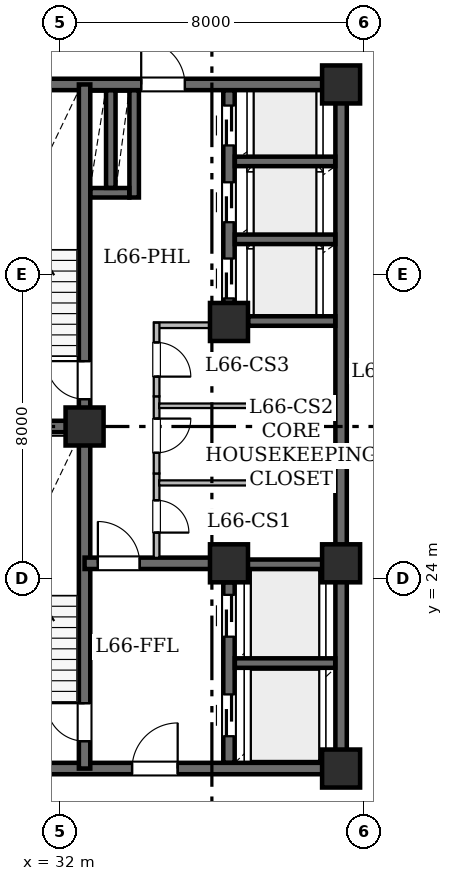
"""IFC4 building model, lengths in metres.
Left out: names, types, materials, properties, quantities, classifications, styles, units other than length and angle.
Written with IfcOpenShell. Run it as: python <this file> out.ifc"""

import sys

from ifc_helpers import new_model, si_unit, direction, frame, frame_2d, origin, origin_2d, place, context, subcontext, project, spatial, rectangle, hollow_rectangle, extrude, element, fill, save


model = new_model("IFC4")
c1 = context("Model", 3, precision=1e-05, world=origin(), true_north=direction((0.0, 1.0)))
c2 = subcontext(c1, "Body", "Model", "MODEL_VIEW")
j1 = project(units=[si_unit("LENGTHUNIT", "METRE"), si_unit("PLANEANGLEUNIT", "RADIAN")], contexts=[c1])
p1 = place(None, origin())
s1 = spatial("IfcSite", under=j1, at=p1, CompositionType="ELEMENT")
p2 = place(p1, origin())
s2 = spatial("IfcBuilding", under=s1, at=p2, CompositionType="ELEMENT")
p3 = place(p2, frame((0.0, 0.0, 257.35)))
s3 = spatial("IfcBuildingStorey", under=s2, at=p3, CompositionType="ELEMENT", Elevation=257.35)
for number, where, z_axis, x_axis in (
    (1, (32.65, 28.0, 0.0), (0.0, 0.0, 1.0), (1.0, 0.0, 0.0)),
    (2, (39.4, 19.0, 0.0), (0.0, 0.0, 1.0), (1.0, 0.0, 0.0)),
    (3, (36.45, 24.4, 0.0), (0.0, 0.0, 1.0), (1.0, 0.0, 0.0)),
    (4, (39.4, 24.4, 0.0), (0.0, 0.0, 1.0), (1.0, 0.0, 0.0)),
    (5, (36.45, 30.75, 0.0), (0.0, 0.0, 1.0), (1.0, 0.0, 0.0)),
    (6, (39.4, 37.0, 0.0), (0.0, 0.0, 1.0), (1.0, 0.0, 0.0)),
):
    element("IfcColumn", number, at=place(p3, frame(where, z_axis=z_axis, x_axis=x_axis)), inside=s3, PredefinedType="COLUMN", context=c2, shape_type="SweptSolid", body=[
        extrude(hollow_rectangle(XDim=1.0, YDim=1.0, WallThickness=0.05, at=origin_2d()), origin(), (0.0, 0.0, 1.0), 3.65),
    ])
p4 = place(p3, frame((29.0, 19.0, 0.0), z_axis=(0.0, 0.0, 1.0), x_axis=(1.0, 0.0, 0.0)))
e7 = element("IfcWall", 7, at=p4, inside=s3, PredefinedType="SHEAR", context=c2, shape_type="SweptSolid", body=[
    extrude(rectangle(XDim=10.4, YDim=0.3, at=frame_2d((5.2, 0.0))), origin(), (0.0, 0.0, 1.0), 3.43),
])
p5 = place(p4, frame((4.9, 0.0, 0.0)))
e8 = element("IfcOpeningElement", 8, at=p5, cuts=e7, PredefinedType="OPENING", context=c2, shape_type="SweptSolid", body=[
    extrude(rectangle(XDim=1.2, YDim=2.15, at=frame_2d((0.6, 1.075))), frame((0.0, 0.16, 0.0), z_axis=(0.0, -1.0, 0.0), x_axis=(1.0, 0.0, 0.0)), (0.0, 0.0, 1.0), 0.32),
])
p6 = place(p3, frame((29.0, 37.0, 0.0), z_axis=(0.0, 0.0, 1.0), x_axis=(1.0, 0.0, 0.0)))
e9 = element("IfcWall", 9, at=p6, inside=s3, PredefinedType="SHEAR", context=c2, shape_type="SweptSolid", body=[
    extrude(rectangle(XDim=10.4, YDim=0.3, at=frame_2d((5.2, 0.0))), origin(), (0.0, 0.0, 1.0), 3.43),
])
p7 = place(p6, frame((5.14, 0.0, 0.0)))
e10 = element("IfcOpeningElement", 10, at=p7, cuts=e9, PredefinedType="OPENING", context=c2, shape_type="SweptSolid", body=[
    extrude(rectangle(XDim=1.15, YDim=2.2, at=frame_2d((0.575, 1.1))), frame((0.0, 0.16, 0.0), z_axis=(0.0, -1.0, 0.0), x_axis=(1.0, 0.0, 0.0)), (0.0, 0.0, 1.0), 0.32),
])
p8 = place(p3, frame((39.4, 19.0, 0.0), z_axis=(0.0, 0.0, 1.0), x_axis=(0.0, 1.0, 0.0)))
e11 = element("IfcWall", 11, at=p8, inside=s3, PredefinedType="SHEAR", context=c2, shape_type="SweptSolid", body=[
    extrude(rectangle(XDim=5.4, YDim=0.3, at=frame_2d((2.7, 0.0))), origin(), (0.0, 0.0, 1.0), 3.43),
])
p9 = place(p3, frame((39.4, 24.4, 0.0), z_axis=(0.0, 0.0, 1.0), x_axis=(0.0, 1.0, 0.0)))
e12 = element("IfcWall", 12, at=p9, inside=s3, PredefinedType="SHEAR", context=c2, shape_type="SweptSolid", body=[
    extrude(rectangle(XDim=12.6, YDim=0.3, at=frame_2d((6.3, 0.0))), origin(), (0.0, 0.0, 1.0), 3.43),
])
p10 = place(p3, frame((32.65, 19.0, 0.0), z_axis=(0.0, 0.0, 1.0), x_axis=(0.0, 1.0, 0.0)))
e13 = element("IfcWall", 13, at=p10, inside=s3, PredefinedType="SHEAR", context=c2, shape_type="SweptSolid", body=[
    extrude(rectangle(XDim=9.0, YDim=0.3, at=frame_2d((4.5, 0.0))), origin(), (0.0, 0.0, 1.0), 3.43),
])
p11 = place(p10, frame((0.72, 0.0, 0.0)))
e14 = element("IfcOpeningElement", 14, at=p11, cuts=e13, PredefinedType="OPENING", context=c2, shape_type="SweptSolid", body=[
    extrude(rectangle(XDim=1.0, YDim=2.15, at=frame_2d((0.5, 1.075))), frame((0.0, 0.16, 0.0), z_axis=(0.0, -1.0, 0.0), x_axis=(1.0, 0.0, 0.0)), (0.0, 0.0, 1.0), 0.32),
])
p12 = place(p3, frame((32.65, 28.0, 0.0), z_axis=(0.0, 0.0, 1.0), x_axis=(0.0, 1.0, 0.0)))
e15 = element("IfcWall", 15, at=p12, inside=s3, PredefinedType="SHEAR", context=c2, shape_type="SweptSolid", body=[
    extrude(rectangle(XDim=9.0, YDim=0.3, at=frame_2d((4.5, 0.0))), origin(), (0.0, 0.0, 1.0), 3.43),
])
p13 = place(p12, frame((0.72, 0.0, 0.0)))
e16 = element("IfcOpeningElement", 16, at=p13, cuts=e15, PredefinedType="OPENING", context=c2, shape_type="SweptSolid", body=[
    extrude(rectangle(XDim=1.0, YDim=2.15, at=frame_2d((0.5, 1.075))), frame((0.0, 0.16, 0.0), z_axis=(0.0, -1.0, 0.0), x_axis=(1.0, 0.0, 0.0)), (0.0, 0.0, 1.0), 0.32),
])
p14 = place(p3, frame((29.0, 28.0, 0.0), z_axis=(0.0, 0.0, 1.0), x_axis=(1.0, 0.0, 0.0)))
e17 = element("IfcWall", 17, at=p14, inside=s3, PredefinedType="SHEAR", context=c2, shape_type="SweptSolid", body=[
    extrude(rectangle(XDim=3.65, YDim=0.3, at=frame_2d((1.825, 0.0))), origin(), (0.0, 0.0, 1.0), 3.43),
])
p15 = place(p3, frame((32.65, 24.4, 0.0), z_axis=(0.0, 0.0, 1.0), x_axis=(1.0, 0.0, 0.0)))
e18 = element("IfcWall", 18, at=p15, inside=s3, PredefinedType="SHEAR", context=c2, shape_type="SweptSolid", body=[
    extrude(rectangle(XDim=3.8, YDim=0.3, at=frame_2d((1.9, 0.0))), origin(), (0.0, 0.0, 1.0), 3.43),
])
p16 = place(p15, frame((0.35, 0.0, 0.0)))
e19 = element("IfcOpeningElement", 19, at=p16, cuts=e18, PredefinedType="OPENING", context=c2, shape_type="SweptSolid", body=[
    extrude(rectangle(XDim=1.1, YDim=2.15, at=frame_2d((0.55, 1.075))), frame((0.0, 0.16, 0.0), z_axis=(0.0, -1.0, 0.0), x_axis=(1.0, 0.0, 0.0)), (0.0, 0.0, 1.0), 0.32),
])
p17 = place(p3, frame((36.45, 19.154, 0.0), z_axis=(0.0, 0.0, 1.0), x_axis=(0.0, 1.0, 0.0)))
e20 = element("IfcWall", 20, at=p17, inside=s3, PredefinedType="SHEAR", context=c2, shape_type="SweptSolid", body=[
    extrude(rectangle(XDim=4.746, YDim=0.3, at=frame_2d((2.373, 0.0))), origin(), (0.0, 0.0, 1.0), 3.43),
])
p18 = place(p17, frame((0.696, 0.0, 0.0)))
e21 = element("IfcOpeningElement", 21, at=p18, cuts=e20, PredefinedType="OPENING", context=c2, shape_type="SweptSolid", body=[
    extrude(rectangle(XDim=1.1, YDim=2.15, at=frame_2d((0.55, 1.075))), frame((0.0, 0.16, 0.0), z_axis=(0.0, -1.0, 0.0), x_axis=(1.0, 0.0, 0.0)), (0.0, 0.0, 1.0), 0.32),
])
p19 = place(p17, frame((3.316, 0.0, 0.0)))
e22 = element("IfcOpeningElement", 22, at=p19, cuts=e20, PredefinedType="OPENING", context=c2, shape_type="SweptSolid", body=[
    extrude(rectangle(XDim=1.1, YDim=2.15, at=frame_2d((0.55, 1.075))), frame((0.0, 0.16, 0.0), z_axis=(0.0, -1.0, 0.0), x_axis=(1.0, 0.0, 0.0)), (0.0, 0.0, 1.0), 0.32),
])
p20 = place(p3, frame((36.45, 31.25, 0.0), z_axis=(0.0, 0.0, 1.0), x_axis=(0.0, 1.0, 0.0)))
e23 = element("IfcWall", 23, at=p20, inside=s3, PredefinedType="SHEAR", context=c2, shape_type="SweptSolid", body=[
    extrude(rectangle(XDim=5.596, YDim=0.3, at=frame_2d((2.798, 0.0))), origin(), (0.0, 0.0, 1.0), 3.43),
])
p21 = place(p20, frame((0.12, 0.0, 0.0)))
e24 = element("IfcOpeningElement", 24, at=p21, cuts=e23, PredefinedType="OPENING", context=c2, shape_type="SweptSolid", body=[
    extrude(rectangle(XDim=1.05, YDim=2.15, at=frame_2d((0.525, 1.075))), frame((0.0, 0.16, 0.0), z_axis=(0.0, -1.0, 0.0), x_axis=(1.0, 0.0, 0.0)), (0.0, 0.0, 1.0), 0.32),
])
p22 = place(p20, frame((2.125, 0.0, 0.0)))
e25 = element("IfcOpeningElement", 25, at=p22, cuts=e23, PredefinedType="OPENING", context=c2, shape_type="SweptSolid", body=[
    extrude(rectangle(XDim=1.05, YDim=2.15, at=frame_2d((0.525, 1.075))), frame((0.0, 0.16, 0.0), z_axis=(0.0, -1.0, 0.0), x_axis=(1.0, 0.0, 0.0)), (0.0, 0.0, 1.0), 0.32),
])
p23 = place(p20, frame((4.145, 0.0, 0.0)))
e26 = element("IfcOpeningElement", 26, at=p23, cuts=e23, PredefinedType="OPENING", context=c2, shape_type="SweptSolid", body=[
    extrude(rectangle(XDim=1.05, YDim=2.15, at=frame_2d((0.525, 1.075))), frame((0.0, 0.16, 0.0), z_axis=(0.0, -1.0, 0.0), x_axis=(1.0, 0.0, 0.0)), (0.0, 0.0, 1.0), 0.32),
])
for number, where, z_axis, x_axis in (
    (27, (36.604, 21.775, 0.0), (0.0, 0.0, 1.0), (1.0, 0.0, 0.0)),
    (28, (36.604, 24.375, 0.0), (0.0, 0.0, 1.0), (1.0, 0.0, 0.0)),
):
    element("IfcWall", number, at=place(p3, frame(where, z_axis=z_axis, x_axis=x_axis)), inside=s3, PredefinedType="SHEAR", context=c2, shape_type="SweptSolid", body=[
        extrude(rectangle(XDim=2.642, YDim=0.25, at=frame_2d((1.321, 0.0))), origin(), (0.0, 0.0, 1.0), 3.43),
    ])
p24 = place(p3, frame((36.954, 30.775, 0.0), z_axis=(0.0, 0.0, 1.0), x_axis=(1.0, 0.0, 0.0)))
e29 = element("IfcWall", 29, at=p24, inside=s3, PredefinedType="SHEAR", context=c2, shape_type="SweptSolid", body=[
    extrude(rectangle(XDim=2.292, YDim=0.25, at=frame_2d((1.146, 0.0))), origin(), (0.0, 0.0, 1.0), 3.43),
])
for number, where, z_axis, x_axis in (
    (30, (36.604, 32.925, 0.0), (0.0, 0.0, 1.0), (1.0, 0.0, 0.0)),
    (31, (36.604, 34.975, 0.0), (0.0, 0.0, 1.0), (1.0, 0.0, 0.0)),
):
    element("IfcWall", number, at=place(p3, frame(where, z_axis=z_axis, x_axis=x_axis)), inside=s3, PredefinedType="SHEAR", context=c2, shape_type="SweptSolid", body=[
        extrude(rectangle(XDim=2.642, YDim=0.25, at=frame_2d((1.321, 0.0))), origin(), (0.0, 0.0, 1.0), 3.43),
    ])
p25 = place(p3, frame((33.955, 34.025, 0.0), z_axis=(0.0, 0.0, 1.0), x_axis=(0.0, 1.0, 0.0)))
e32 = element("IfcWall", 32, at=p25, inside=s3, PredefinedType="SHEAR", context=c2, shape_type="SweptSolid", body=[
    extrude(rectangle(XDim=2.821, YDim=0.25, at=frame_2d((1.411, 0.0))), origin(), (0.0, 0.0, 1.0), 3.43),
])
p26 = place(p3, frame((32.804, 34.15, 0.0), z_axis=(0.0, 0.0, 1.0), x_axis=(1.0, 0.0, 0.0)))
e33 = element("IfcWall", 33, at=p26, inside=s3, PredefinedType="SHEAR", context=c2, shape_type="SweptSolid", body=[
    extrude(rectangle(XDim=1.022, YDim=0.25, at=frame_2d((0.511, 0.0))), origin(), (0.0, 0.0, 1.0), 3.43),
])
p27 = place(p3, frame((33.34, 34.279, 0.0), z_axis=(0.0, 0.0, 1.0), x_axis=(0.0, 1.0, 0.0)))
e34 = element("IfcWall", 34, at=p27, inside=s3, PredefinedType="SHEAR", context=c2, shape_type="SweptSolid", body=[
    extrude(rectangle(XDim=2.567, YDim=0.25, at=frame_2d((1.283, 0.0))), origin(), (0.0, 0.0, 1.0), 3.43),
])
p28 = place(p3, frame((34.545, 26.764, 0.0), z_axis=(0.0, 0.0, 1.0), x_axis=(0.0, -1.0, 0.0)))
e35 = element("IfcWall", 35, at=p28, inside=s3, PredefinedType="STANDARD", context=c2, shape_type="SweptSolid", body=[
    extrude(rectangle(XDim=2.22, YDim=0.15, at=frame_2d((1.11, 0.0))), origin(), (0.0, 0.0, 1.0), 3.43),
])
p29 = place(p28, frame((0.706, 0.0, 0.0)))
e36 = element("IfcOpeningElement", 36, at=p29, cuts=e35, PredefinedType="OPENING", context=c2, shape_type="SweptSolid", body=[
    extrude(rectangle(XDim=0.85, YDim=2.1, at=frame_2d((0.425, 1.05))), frame((0.0, 0.085, 0.0), z_axis=(0.0, -1.0, 0.0), x_axis=(1.0, 0.0, 0.0)), (0.0, 0.0, 1.0), 0.17),
])
p30 = place(p3, frame((34.545, 28.794, 0.0), z_axis=(0.0, 0.0, 1.0), x_axis=(0.0, -1.0, 0.0)))
e37 = element("IfcWall", 37, at=p30, inside=s3, PredefinedType="STANDARD", context=c2, shape_type="SweptSolid", body=[
    extrude(rectangle(XDim=2.03, YDim=0.15, at=frame_2d((1.015, 0.0))), origin(), (0.0, 0.0, 1.0), 3.43),
])
p31 = place(p30, frame((0.586, 0.0, 0.0)))
e38 = element("IfcOpeningElement", 38, at=p31, cuts=e37, PredefinedType="OPENING", context=c2, shape_type="SweptSolid", body=[
    extrude(rectangle(XDim=0.9, YDim=2.1, at=frame_2d((0.45, 1.05))), frame((0.0, 0.085, 0.0), z_axis=(0.0, -1.0, 0.0), x_axis=(1.0, 0.0, 0.0)), (0.0, 0.0, 1.0), 0.17),
])
p32 = place(p3, frame((36.3, 30.665, 0.0), z_axis=(0.0, 0.0, 1.0), x_axis=(-1.0, 0.0, 0.0)))
e39 = element("IfcWall", 39, at=p32, inside=s3, PredefinedType="STANDARD", context=c2, shape_type="SweptSolid", body=[
    extrude(rectangle(XDim=1.82, YDim=0.15, at=frame_2d((0.91, 0.0))), origin(), (0.0, 0.0, 1.0), 3.43),
])
p33 = place(p3, frame((34.545, 30.73, 0.0), z_axis=(0.0, 0.0, 1.0), x_axis=(0.0, -1.0, 0.0)))
e40 = element("IfcWall", 40, at=p33, inside=s3, PredefinedType="STANDARD", context=c2, shape_type="SweptSolid", body=[
    extrude(rectangle(XDim=1.936, YDim=0.15, at=frame_2d((0.968, 0.0))), origin(), (0.0, 0.0, 1.0), 3.43),
])
p34 = place(p33, frame((0.518, 0.0, 0.0)))
e41 = element("IfcOpeningElement", 41, at=p34, cuts=e40, PredefinedType="OPENING", context=c2, shape_type="SweptSolid", body=[
    extrude(rectangle(XDim=0.9, YDim=2.1, at=frame_2d((0.45, 1.05))), frame((0.0, 0.085, 0.0), z_axis=(0.0, -1.0, 0.0), x_axis=(1.0, 0.0, 0.0)), (0.0, 0.0, 1.0), 0.17),
])
p35 = place(p3, frame((34.612, 26.515, 0.0), z_axis=(0.0, 0.0, 1.0), x_axis=(1.0, 0.0, 0.0)))
e42 = element("IfcWall", 42, at=p35, inside=s3, PredefinedType="PARTITIONING", context=c2, shape_type="SweptSolid", body=[
    extrude(rectangle(XDim=4.644, YDim=0.135, at=frame_2d((2.322, 0.0))), origin(), (0.0, 0.0, 1.0), 3.43),
])
p36 = place(p3, frame((34.612, 28.545, 0.0), z_axis=(0.0, 0.0, 1.0), x_axis=(1.0, 0.0, 0.0)))
e43 = element("IfcWall", 43, at=p36, inside=s3, PredefinedType="PARTITIONING", context=c2, shape_type="SweptSolid", body=[
    extrude(rectangle(XDim=4.644, YDim=0.12, at=frame_2d((2.322, 0.0))), origin(), (0.0, 0.0, 1.0), 3.43),
])
p37 = place(p11, origin())
e44 = element("IfcDoor", 44, at=p37, inside=s3, OperationType="SINGLE_SWING_RIGHT", PredefinedType="DOOR", context=c2, shape_type="SweptSolid", body=[
    extrude(rectangle(XDim=1.0, YDim=2.15, at=frame_2d((0.5, 1.075))), frame((0.0, 0.025, 0.0), z_axis=(0.0, -1.0, 0.0), x_axis=(1.0, 0.0, 0.0)), (0.0, 0.0, 1.0), 0.05),
])
fill(e14, e44)
p38 = place(p13, origin())
e45 = element("IfcDoor", 45, at=p38, inside=s3, OperationType="SINGLE_SWING_RIGHT", PredefinedType="DOOR", context=c2, shape_type="SweptSolid", body=[
    extrude(rectangle(XDim=1.0, YDim=2.15, at=frame_2d((0.5, 1.075))), frame((0.0, 0.025, 0.0), z_axis=(0.0, -1.0, 0.0), x_axis=(1.0, 0.0, 0.0)), (0.0, 0.0, 1.0), 0.05),
])
fill(e16, e45)
p39 = place(p16, origin())
e46 = element("IfcDoor", 46, at=p39, inside=s3, OperationType="SINGLE_SWING_LEFT", PredefinedType="DOOR", context=c2, shape_type="SweptSolid", body=[
    extrude(rectangle(XDim=1.1, YDim=2.15, at=frame_2d((0.55, 1.075))), frame((0.0, 0.025, 0.0), z_axis=(0.0, -1.0, 0.0), x_axis=(1.0, 0.0, 0.0)), (0.0, 0.0, 1.0), 0.05),
])
fill(e19, e46)
p40 = place(p5, origin())
e47 = element("IfcDoor", 47, at=p40, inside=s3, OperationType="SINGLE_SWING_RIGHT", PredefinedType="DOOR", context=c2, shape_type="SweptSolid", body=[
    extrude(rectangle(XDim=1.2, YDim=2.15, at=frame_2d((0.6, 1.075))), frame((0.0, 0.025, 0.0), z_axis=(0.0, -1.0, 0.0), x_axis=(1.0, 0.0, 0.0)), (0.0, 0.0, 1.0), 0.05),
])
fill(e8, e47)
p41 = place(p7, origin())
e48 = element("IfcDoor", 48, at=p41, inside=s3, OperationType="SINGLE_SWING_LEFT", PredefinedType="DOOR", context=c2, shape_type="SweptSolid", body=[
    extrude(rectangle(XDim=1.15, YDim=2.2, at=frame_2d((0.575, 1.1))), frame((0.0, 0.025, 0.0), z_axis=(0.0, -1.0, 0.0), x_axis=(1.0, 0.0, 0.0)), (0.0, 0.0, 1.0), 0.05),
])
fill(e10, e48)
p42 = place(p18, origin())
e49 = element("IfcDoor", 49, at=p42, inside=s3, OperationType="SLIDING_TO_LEFT", PredefinedType="DOOR", context=c2, shape_type="SweptSolid", body=[
    extrude(rectangle(XDim=1.1, YDim=2.15, at=frame_2d((0.55, 1.075))), frame((0.0, 0.025, 0.0), z_axis=(0.0, -1.0, 0.0), x_axis=(1.0, 0.0, 0.0)), (0.0, 0.0, 1.0), 0.05),
])
fill(e21, e49)
p43 = place(p19, origin())
e50 = element("IfcDoor", 50, at=p43, inside=s3, OperationType="SLIDING_TO_LEFT", PredefinedType="DOOR", context=c2, shape_type="SweptSolid", body=[
    extrude(rectangle(XDim=1.1, YDim=2.15, at=frame_2d((0.55, 1.075))), frame((0.0, 0.025, 0.0), z_axis=(0.0, -1.0, 0.0), x_axis=(1.0, 0.0, 0.0)), (0.0, 0.0, 1.0), 0.05),
])
fill(e22, e50)
p44 = place(p21, origin())
e51 = element("IfcDoor", 51, at=p44, inside=s3, OperationType="SLIDING_TO_LEFT", PredefinedType="DOOR", context=c2, shape_type="SweptSolid", body=[
    extrude(rectangle(XDim=1.05, YDim=2.15, at=frame_2d((0.525, 1.075))), frame((0.0, 0.025, 0.0), z_axis=(0.0, -1.0, 0.0), x_axis=(1.0, 0.0, 0.0)), (0.0, 0.0, 1.0), 0.05),
])
fill(e24, e51)
p45 = place(p22, origin())
e52 = element("IfcDoor", 52, at=p45, inside=s3, OperationType="SLIDING_TO_LEFT", PredefinedType="DOOR", context=c2, shape_type="SweptSolid", body=[
    extrude(rectangle(XDim=1.05, YDim=2.15, at=frame_2d((0.525, 1.075))), frame((0.0, 0.025, 0.0), z_axis=(0.0, -1.0, 0.0), x_axis=(1.0, 0.0, 0.0)), (0.0, 0.0, 1.0), 0.05),
])
fill(e25, e52)
p46 = place(p23, origin())
e53 = element("IfcDoor", 53, at=p46, inside=s3, OperationType="SLIDING_TO_LEFT", PredefinedType="DOOR", context=c2, shape_type="SweptSolid", body=[
    extrude(rectangle(XDim=1.05, YDim=2.15, at=frame_2d((0.525, 1.075))), frame((0.0, 0.025, 0.0), z_axis=(0.0, -1.0, 0.0), x_axis=(1.0, 0.0, 0.0)), (0.0, 0.0, 1.0), 0.05),
])
fill(e26, e53)
p47 = place(p29, origin())
e54 = element("IfcDoor", 54, at=p47, inside=s3, OperationType="SINGLE_SWING_RIGHT", PredefinedType="DOOR", context=c2, shape_type="SweptSolid", body=[
    extrude(rectangle(XDim=0.85, YDim=2.1, at=frame_2d((0.425, 1.05))), frame((0.0, 0.025, 0.0), z_axis=(0.0, -1.0, 0.0), x_axis=(1.0, 0.0, 0.0)), (0.0, 0.0, 1.0), 0.05),
])
fill(e36, e54)
p48 = place(p31, origin())
e55 = element("IfcDoor", 55, at=p48, inside=s3, OperationType="SINGLE_SWING_LEFT", PredefinedType="DOOR", context=c2, shape_type="SweptSolid", body=[
    extrude(rectangle(XDim=0.9, YDim=2.1, at=frame_2d((0.45, 1.05))), frame((0.0, 0.025, 0.0), z_axis=(0.0, -1.0, 0.0), x_axis=(1.0, 0.0, 0.0)), (0.0, 0.0, 1.0), 0.05),
])
fill(e38, e55)
p49 = place(p34, origin())
e56 = element("IfcDoor", 56, at=p49, inside=s3, OperationType="SINGLE_SWING_RIGHT", PredefinedType="DOOR", context=c2, shape_type="SweptSolid", body=[
    extrude(rectangle(XDim=0.9, YDim=2.1, at=frame_2d((0.45, 1.05))), frame((0.0, 0.025, 0.0), z_axis=(0.0, -1.0, 0.0), x_axis=(1.0, 0.0, 0.0)), (0.0, 0.0, 1.0), 0.05),
])
fill(e41, e56)
save(model, sys.argv[1])
